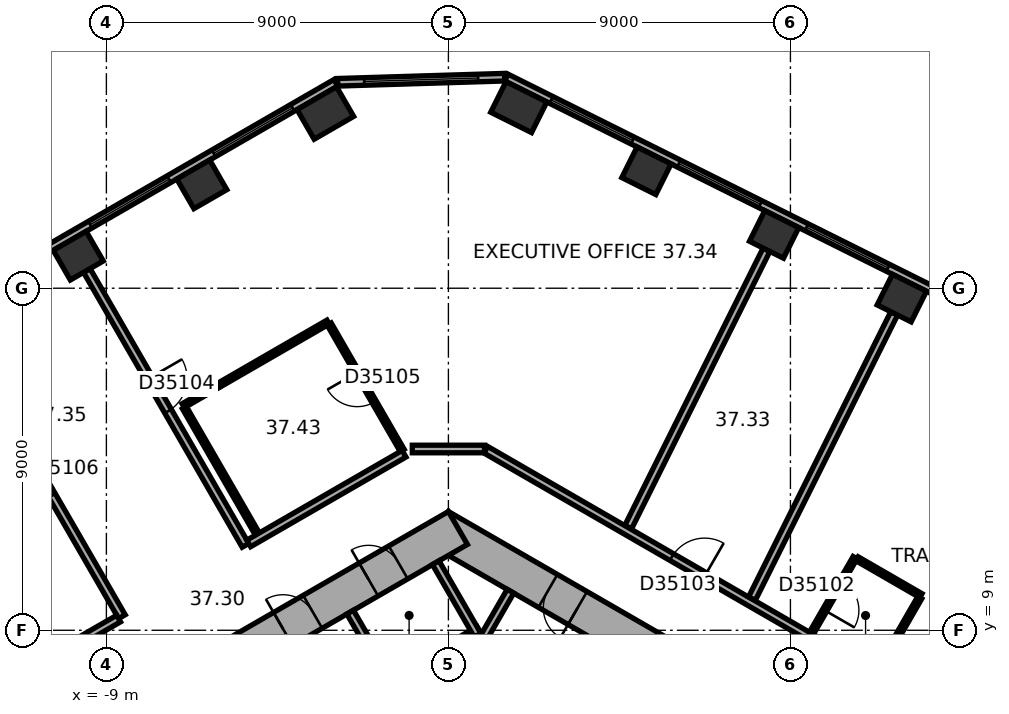
"""IFC4 building model, lengths in metres.
Left out: names, types, materials, properties, quantities, classifications, styles, units other than length and angle.
Written with IfcOpenShell. Run it as: python <this file> out.ifc"""

import sys

from ifc_helpers import new_model, si_unit, direction, frame, frame_2d, origin, origin_2d, place, context, subcontext, project, spatial, rectangle, extrude, element, fill, save


model = new_model("IFC4")
c1 = context("Model", 3, precision=1e-05, world=origin(), true_north=direction((0.0, 1.0)))
c2 = subcontext(c1, "Body", "Model", "MODEL_VIEW")
j1 = project(units=[si_unit("LENGTHUNIT", "METRE"), si_unit("PLANEANGLEUNIT", "RADIAN")], contexts=[c1])
p1 = place(None, origin())
s1 = spatial("IfcSite", under=j1, at=p1, CompositionType="ELEMENT")
p2 = place(p1, origin())
s2 = spatial("IfcBuilding", under=s1, at=p2, CompositionType="ELEMENT")
p3 = place(p2, frame((0.0, 0.0, 154.0)))
s3 = spatial("IfcBuildingStorey", under=s2, at=p3, CompositionType="ELEMENT", Elevation=154.0)
for number, where, z_axis, x_axis in (
    (1, (11.931, 17.74, 0.0), (0.0, 0.0, 1.0), (-0.895, 0.446, 0.0)),
    (2, (8.571, 19.416, 0.0), (0.0, 0.0, 1.0), (-0.895, 0.446, 0.0)),
    (3, (5.211, 21.091, 0.0), (0.0, 0.0, 1.0), (-0.895, 0.446, 0.0)),
):
    element("IfcColumn", number, at=place(p3, frame(where, z_axis=z_axis, x_axis=x_axis)), inside=s3, PredefinedType="COLUMN", context=c2, shape_type="SweptSolid", body=[
        extrude(rectangle(XDim=1.0, YDim=0.9, at=origin_2d()), origin(), (0.0, 0.0, 1.0), 3.7),
    ])
for number, where, z_axis, x_axis in (
    (4, (1.852, 22.766, 0.0), (0.0, 0.0, 1.0), (-0.895, 0.446, 0.0)),
    (5, (-3.238, 22.61, 0.0), (0.0, 0.0, 1.0), (-0.866, -0.5, 0.0)),
):
    element("IfcColumn", number, at=place(p3, frame(where, z_axis=z_axis, x_axis=x_axis)), inside=s3, PredefinedType="COLUMN", context=c2, shape_type="SweptSolid", body=[
        extrude(rectangle(XDim=1.2, YDim=0.9, at=origin_2d()), origin(), (0.0, 0.0, 1.0), 3.7),
    ])
for number, where, z_axis, x_axis in (
    (6, (-6.489, 20.733, 0.0), (0.0, 0.0, 1.0), (-0.866, -0.5, 0.0)),
    (7, (-9.74, 18.856, 0.0), (0.0, 0.0, 1.0), (-0.866, -0.5, 0.0)),
):
    element("IfcColumn", number, at=place(p3, frame(where, z_axis=z_axis, x_axis=x_axis)), inside=s3, PredefinedType="COLUMN", context=c2, shape_type="SweptSolid", body=[
        extrude(rectangle(XDim=1.0, YDim=0.9, at=origin_2d()), origin(), (0.0, 0.0, 1.0), 3.7),
    ])
p4 = place(p3, frame((10.25, 5.629, 0.0), z_axis=(0.0, 0.0, 1.0), x_axis=(-0.866022616891, 0.50000482701, 0.0)))
e8 = element("IfcWall", 8, at=p4, inside=s3, PredefinedType="SHEAR", context=c2, shape_type="SweptSolid", body=[
    extrude(rectangle(XDim=12.125, YDim=1.0, at=frame_2d((6.062, 0.0))), origin(), (0.0, 0.0, 1.0), 3.7),
])
p5 = place(p4, frame((4.012, 0.0, 0.0)))
e9 = element("IfcOpeningElement", 9, at=p5, cuts=e8, PredefinedType="OPENING", context=c2, shape_type="SweptSolid", body=[
    extrude(rectangle(XDim=0.9, YDim=2.1, at=frame_2d((0.45, 1.05))), frame((0.0, 0.51, 0.0), z_axis=(0.0, -1.0, 0.0), x_axis=(1.0, 0.0, 0.0)), (0.0, 0.0, 1.0), 1.02),
])
p6 = place(p4, frame((7.912, 0.0, 0.0)))
e10 = element("IfcOpeningElement", 10, at=p6, cuts=e8, PredefinedType="OPENING", context=c2, shape_type="SweptSolid", body=[
    extrude(rectangle(XDim=0.9, YDim=2.1, at=frame_2d((0.45, 1.05))), frame((0.0, 0.51, 0.0), z_axis=(0.0, -1.0, 0.0), x_axis=(1.0, 0.0, 0.0)), (0.0, 0.0, 1.0), 1.02),
])
p7 = place(p3, frame((0.25, 11.691, 0.0), z_axis=(0.0, 0.0, 1.0), x_axis=(-0.866022616891, -0.50000482701, 0.0)))
e11 = element("IfcWall", 11, at=p7, inside=s3, PredefinedType="SHEAR", context=c2, shape_type="SweptSolid", body=[
    extrude(rectangle(XDim=12.125, YDim=1.0, at=frame_2d((6.062, 0.0))), origin(), (0.0, 0.0, 1.0), 3.7),
])
p8 = place(p7, frame((6.262, 0.0, 0.0)))
e12 = element("IfcOpeningElement", 12, at=p8, cuts=e11, PredefinedType="OPENING", context=c2, shape_type="SweptSolid", body=[
    extrude(rectangle(XDim=1.5, YDim=2.1, at=frame_2d((0.75, 1.05))), frame((0.0, 0.51, 0.0), z_axis=(0.0, -1.0, 0.0), x_axis=(1.0, 0.0, 0.0)), (0.0, 0.0, 1.0), 1.02),
])
p9 = place(p7, frame((1.812, 0.0, 0.0)))
e13 = element("IfcOpeningElement", 13, at=p9, cuts=e11, PredefinedType="OPENING", context=c2, shape_type="SweptSolid", body=[
    extrude(rectangle(XDim=0.9, YDim=2.1, at=frame_2d((0.45, 1.05))), frame((0.0, 0.51, 0.0), z_axis=(0.0, -1.0, 0.0), x_axis=(1.0, 0.0, 0.0)), (0.0, 0.0, 1.0), 1.02),
])
p10 = place(p7, frame((4.412, 0.0, 0.0)))
e14 = element("IfcOpeningElement", 14, at=p10, cuts=e11, PredefinedType="OPENING", context=c2, shape_type="SweptSolid", body=[
    extrude(rectangle(XDim=0.9, YDim=2.1, at=frame_2d((0.45, 1.05))), frame((0.0, 0.51, 0.0), z_axis=(0.0, -1.0, 0.0), x_axis=(1.0, 0.0, 0.0)), (0.0, 0.0, 1.0), 1.02),
])
p11 = place(p3, frame((19.464, 14.599, 0.0), z_axis=(0.0, 0.0, 1.0), x_axis=(-0.894935755043, 0.446195018289, 0.0)))
e15 = element("IfcWall", 15, at=p11, inside=s3, PredefinedType="STANDARD", context=c2, shape_type="SweptSolid", body=[
    extrude(rectangle(XDim=20.044, YDim=0.2, at=frame_2d((10.022, 0.0))), origin(), (0.0, 0.0, 1.0), 3.7),
])
p12 = place(p11, frame((1.313, 0.0, 0.9)))
e16 = element("IfcOpeningElement", 16, at=p12, cuts=e15, PredefinedType="OPENING", context=c2, shape_type="SweptSolid", body=[
    extrude(rectangle(XDim=2.4, YDim=2.0, at=frame_2d((1.2, 1.0))), frame((0.0, 0.11, 0.0), z_axis=(0.0, -1.0, 0.0), x_axis=(1.0, 0.0, 0.0)), (0.0, 0.0, 1.0), 0.22),
])
p13 = place(p11, frame((5.067, 0.0, 0.9)))
e17 = element("IfcOpeningElement", 17, at=p13, cuts=e15, PredefinedType="OPENING", context=c2, shape_type="SweptSolid", body=[
    extrude(rectangle(XDim=2.4, YDim=2.0, at=frame_2d((1.2, 1.0))), frame((0.0, 0.11, 0.0), z_axis=(0.0, -1.0, 0.0), x_axis=(1.0, 0.0, 0.0)), (0.0, 0.0, 1.0), 0.22),
])
p14 = place(p11, frame((8.821, 0.0, 0.9)))
e18 = element("IfcOpeningElement", 18, at=p14, cuts=e15, PredefinedType="OPENING", context=c2, shape_type="SweptSolid", body=[
    extrude(rectangle(XDim=2.4, YDim=2.0, at=frame_2d((1.2, 1.0))), frame((0.0, 0.11, 0.0), z_axis=(0.0, -1.0, 0.0), x_axis=(1.0, 0.0, 0.0)), (0.0, 0.0, 1.0), 0.22),
])
p15 = place(p11, frame((12.575, 0.0, 0.9)))
e19 = element("IfcOpeningElement", 19, at=p15, cuts=e15, PredefinedType="OPENING", context=c2, shape_type="SweptSolid", body=[
    extrude(rectangle(XDim=2.4, YDim=2.0, at=frame_2d((1.2, 1.0))), frame((0.0, 0.11, 0.0), z_axis=(0.0, -1.0, 0.0), x_axis=(1.0, 0.0, 0.0)), (0.0, 0.0, 1.0), 0.22),
])
p16 = place(p11, frame((16.329, 0.0, 0.9)))
e20 = element("IfcOpeningElement", 20, at=p16, cuts=e15, PredefinedType="OPENING", context=c2, shape_type="SweptSolid", body=[
    extrude(rectangle(XDim=2.4, YDim=2.0, at=frame_2d((1.2, 1.0))), frame((0.0, 0.11, 0.0), z_axis=(0.0, -1.0, 0.0), x_axis=(1.0, 0.0, 0.0)), (0.0, 0.0, 1.0), 0.22),
])
p17 = place(p3, frame((1.479, 23.553, 0.0), z_axis=(0.0, 0.0, 1.0), x_axis=(-0.999534786117, -0.03049936625, 0.0)))
e21 = element("IfcWall", 21, at=p17, inside=s3, PredefinedType="STANDARD", context=c2, shape_type="SweptSolid", body=[
    extrude(rectangle(XDim=4.395, YDim=0.2, at=frame_2d((2.197, 0.0))), origin(), (0.0, 0.0, 1.0), 3.7),
])
p18 = place(p17, frame((0.698, 0.0, 0.9)))
e22 = element("IfcOpeningElement", 22, at=p18, cuts=e21, PredefinedType="OPENING", context=c2, shape_type="SweptSolid", body=[
    extrude(rectangle(XDim=3.0, YDim=2.0, at=frame_2d((1.5, 1.0))), frame((0.0, 0.11, 0.0), z_axis=(0.0, -1.0, 0.0), x_axis=(1.0, 0.0, 0.0)), (0.0, 0.0, 1.0), 0.22),
])
p19 = place(p3, frame((-2.961, 23.405, 0.0), z_axis=(0.0, 0.0, 1.0), x_axis=(-0.866023315909, -0.500003616288, 0.0)))
e23 = element("IfcWall", 23, at=p19, inside=s3, PredefinedType="STANDARD", context=c2, shape_type="SweptSolid", body=[
    extrude(rectangle(XDim=20.044, YDim=0.2, at=frame_2d((10.022, 0.0))), origin(), (0.0, 0.0, 1.0), 3.7),
])
p20 = place(p19, frame((1.314, 0.0, 0.9)))
e24 = element("IfcOpeningElement", 24, at=p20, cuts=e23, PredefinedType="OPENING", context=c2, shape_type="SweptSolid", body=[
    extrude(rectangle(XDim=2.4, YDim=2.0, at=frame_2d((1.2, 1.0))), frame((0.0, 0.11, 0.0), z_axis=(0.0, -1.0, 0.0), x_axis=(1.0, 0.0, 0.0)), (0.0, 0.0, 1.0), 0.22),
])
p21 = place(p19, frame((5.069, 0.0, 0.9)))
e25 = element("IfcOpeningElement", 25, at=p21, cuts=e23, PredefinedType="OPENING", context=c2, shape_type="SweptSolid", body=[
    extrude(rectangle(XDim=2.4, YDim=2.0, at=frame_2d((1.2, 1.0))), frame((0.0, 0.11, 0.0), z_axis=(0.0, -1.0, 0.0), x_axis=(1.0, 0.0, 0.0)), (0.0, 0.0, 1.0), 0.22),
])
p22 = place(p19, frame((8.823, 0.0, 0.9)))
e26 = element("IfcOpeningElement", 26, at=p22, cuts=e23, PredefinedType="OPENING", context=c2, shape_type="SweptSolid", body=[
    extrude(rectangle(XDim=2.4, YDim=2.0, at=frame_2d((1.2, 1.0))), frame((0.0, 0.11, 0.0), z_axis=(0.0, -1.0, 0.0), x_axis=(1.0, 0.0, 0.0)), (0.0, 0.0, 1.0), 0.22),
])
p23 = place(p19, frame((12.577, 0.0, 0.9)))
e27 = element("IfcOpeningElement", 27, at=p23, cuts=e23, PredefinedType="OPENING", context=c2, shape_type="SweptSolid", body=[
    extrude(rectangle(XDim=2.4, YDim=2.0, at=frame_2d((1.2, 1.0))), frame((0.0, 0.11, 0.0), z_axis=(0.0, -1.0, 0.0), x_axis=(1.0, 0.0, 0.0)), (0.0, 0.0, 1.0), 0.22),
])
p24 = place(p19, frame((16.331, 0.0, 0.9)))
e28 = element("IfcOpeningElement", 28, at=p24, cuts=e23, PredefinedType="OPENING", context=c2, shape_type="SweptSolid", body=[
    extrude(rectangle(XDim=2.4, YDim=2.0, at=frame_2d((1.2, 1.0))), frame((0.0, 0.11, 0.0), z_axis=(0.0, -1.0, 0.0), x_axis=(1.0, 0.0, 0.0)), (0.0, 0.0, 1.0), 0.22),
])
p25 = place(p3, frame((0.532, 8.122, 0.0), z_axis=(0.0, 0.0, 1.0), x_axis=(0.500077893725, 0.86598042715, 0.0)))
e29 = element("IfcWall", 29, at=p25, inside=s3, PredefinedType="PARTITIONING", context=c2, shape_type="SweptSolid", body=[
    extrude(rectangle(XDim=2.2, YDim=0.2, at=frame_2d((1.1, 0.0))), origin(), (0.0, 0.0, 1.0), 3.42),
])
p26 = place(p3, frame((0.803, 9.009, 0.0), z_axis=(0.0, 0.0, 1.0), x_axis=(-0.866028230842, -0.499995103361, 0.0)))
e30 = element("IfcWall", 30, at=p26, inside=s3, PredefinedType="PARTITIONING", context=c2, shape_type="SweptSolid", body=[
    extrude(rectangle(XDim=5.4, YDim=0.2, at=frame_2d((2.7, 0.0))), origin(), (0.0, 0.0, 1.0), 3.42),
])
p27 = place(p3, frame((0.767, 8.872, 0.0), z_axis=(0.0, 0.0, 1.0), x_axis=(-0.499994660107, 0.866028486751, 0.0)))
e31 = element("IfcWall", 31, at=p27, inside=s3, PredefinedType="PARTITIONING", context=c2, shape_type="SweptSolid", body=[
    extrude(rectangle(XDim=2.2, YDim=0.2, at=frame_2d((1.1, 0.0))), origin(), (0.0, 0.0, 1.0), 3.42),
])
p28 = place(p3, frame((-1.485, 7.572, 0.0), z_axis=(0.0, 0.0, 1.0), x_axis=(-0.50002983664, 0.866008176907, 0.0)))
e32 = element("IfcWall", 32, at=p28, inside=s3, PredefinedType="PARTITIONING", context=c2, shape_type="SweptSolid", body=[
    extrude(rectangle(XDim=2.2, YDim=0.2, at=frame_2d((1.1, 0.0))), origin(), (0.0, 0.0, 1.0), 3.42),
])
p29 = place(p3, frame((-12.766, 16.589, 0.0), z_axis=(0.0, 0.0, 1.0), x_axis=(0.500010139422, -0.866019549707, 0.0)))
e33 = element("IfcWall", 33, at=p29, inside=s3, PredefinedType="PARTITIONING", context=c2, shape_type="SweptSolid", body=[
    extrude(rectangle(XDim=8.35, YDim=0.2, at=frame_2d((4.175, 0.0))), origin(), (0.0, 0.0, 1.0), 3.42),
])
p30 = place(p29, frame((3.675, 0.0, 0.0)))
e34 = element("IfcOpeningElement", 34, at=p30, cuts=e33, PredefinedType="OPENING", context=c2, shape_type="SweptSolid", body=[
    extrude(rectangle(XDim=1.0, YDim=2.1, at=frame_2d((0.5, 1.05))), frame((0.0, 0.11, 0.0), z_axis=(0.0, -1.0, 0.0), x_axis=(1.0, 0.0, 0.0)), (0.0, 0.0, 1.0), 0.22),
])
p31 = place(p3, frame((-9.515, 18.466, 0.0), z_axis=(0.0, 0.0, 1.0), x_axis=(0.500010139422, -0.866019549707, 0.0)))
e35 = element("IfcWall", 35, at=p31, inside=s3, PredefinedType="PARTITIONING", context=c2, shape_type="SweptSolid", body=[
    extrude(rectangle(XDim=8.35, YDim=0.2, at=frame_2d((4.175, 0.0))), origin(), (0.0, 0.0, 1.0), 2.87),
])
p32 = place(p31, frame((3.275, 0.0, 0.0)))
e36 = element("IfcOpeningElement", 36, at=p32, cuts=e35, PredefinedType="OPENING", context=c2, shape_type="SweptSolid", body=[
    extrude(rectangle(XDim=1.0, YDim=2.1, at=frame_2d((0.5, 1.05))), frame((0.0, 0.11, 0.0), z_axis=(0.0, -1.0, 0.0), x_axis=(1.0, 0.0, 0.0)), (0.0, 0.0, 1.0), 0.22),
])
p33 = place(p3, frame((-8.678, 9.308, 0.0), z_axis=(0.0, 0.0, 1.0), x_axis=(-0.866000359435, -0.500043375578, 0.0)))
e37 = element("IfcWall", 37, at=p33, inside=s3, PredefinedType="PARTITIONING", context=c2, shape_type="SweptSolid", body=[
    extrude(rectangle(XDim=3.161, YDim=0.2, at=frame_2d((1.581, 0.0))), origin(), (0.0, 0.0, 1.0), 3.42),
])
p34 = place(p3, frame((-6.977, 14.909, 0.0), z_axis=(0.0, 0.0, 1.0), x_axis=(0.866032203192, 0.499988222896, 0.0)))
e38 = element("IfcWall", 38, at=p34, inside=s3, PredefinedType="PARTITIONING", context=c2, shape_type="SweptSolid", body=[
    extrude(rectangle(XDim=4.4, YDim=0.12, at=frame_2d((2.2, 0.0))), origin(), (0.0, 0.0, 1.0), 3.42),
])
p35 = place(p3, frame((-5.027, 11.531, 0.0), z_axis=(0.0, 0.0, 1.0), x_axis=(-0.499995802899, 0.866027826969, 0.0)))
e39 = element("IfcWall", 39, at=p35, inside=s3, PredefinedType="PARTITIONING", context=c2, shape_type="SweptSolid", body=[
    extrude(rectangle(XDim=3.84, YDim=0.12, at=frame_2d((1.92, 0.0))), origin(), (0.0, 0.0, 1.0), 3.42),
])
p36 = place(p3, frame((-3.136, 17.057, 0.0), z_axis=(0.0, 0.0, 1.0), x_axis=(0.499995802899, -0.866027826969, 0.0)))
e40 = element("IfcWall", 40, at=p36, inside=s3, PredefinedType="PARTITIONING", context=c2, shape_type="SweptSolid", body=[
    extrude(rectangle(XDim=3.84, YDim=0.12, at=frame_2d((1.92, 0.0))), origin(), (0.0, 0.0, 1.0), 3.42),
])
p37 = place(p36, frame((1.47, 0.0, 0.0)))
e41 = element("IfcOpeningElement", 41, at=p37, cuts=e40, PredefinedType="OPENING", context=c2, shape_type="SweptSolid", body=[
    extrude(rectangle(XDim=0.9, YDim=2.1, at=frame_2d((0.45, 1.05))), frame((0.0, 0.07, 0.0), z_axis=(0.0, -1.0, 0.0), x_axis=(1.0, 0.0, 0.0)), (0.0, 0.0, 1.0), 0.14),
])
p38 = place(p3, frame((-1.167, 13.645, 0.0), z_axis=(0.0, 0.0, 1.0), x_axis=(-0.866034830959, -0.499983671299, 0.0)))
e42 = element("IfcWall", 42, at=p38, inside=s3, PredefinedType="PARTITIONING", context=c2, shape_type="SweptSolid", body=[
    extrude(rectangle(XDim=4.719, YDim=0.2, at=frame_2d((2.36, 0.0))), origin(), (0.0, 0.0, 1.0), 3.42),
])
p39 = place(p3, frame((0.95, 13.77, 0.0), z_axis=(0.0, 0.0, 1.0), x_axis=(-1.0, 0.0, 0.0)))
e43 = element("IfcWall", 43, at=p39, inside=s3, PredefinedType="PARTITIONING", context=c2, shape_type="SweptSolid", body=[
    extrude(rectangle(XDim=1.9, YDim=0.2, at=frame_2d((0.95, 0.0))), origin(), (0.0, 0.0, 1.0), 3.42),
])
p40 = place(p3, frame((8.37, 19.013, 0.0), z_axis=(0.0, 0.0, 1.0), x_axis=(-0.446183598632, -0.894941448538, 0.0)))
e44 = element("IfcWall", 44, at=p40, inside=s3, PredefinedType="PARTITIONING", context=c2, shape_type="SweptSolid", body=[
    extrude(rectangle(XDim=8.156, YDim=0.2, at=frame_2d((4.078, 0.0))), origin(), (0.0, 0.0, 1.0), 3.42),
])
p41 = place(p3, frame((9.552, 8.919, 0.0), z_axis=(0.0, 0.0, 1.0), x_axis=(0.499952165731, 0.866053019151, 0.0)))
e45 = element("IfcWall", 45, at=p41, inside=s3, PredefinedType="PARTITIONING", context=c2, shape_type="SweptSolid", body=[
    extrude(rectangle(XDim=2.3, YDim=0.12, at=frame_2d((1.15, 0.0))), origin(), (0.0, 0.0, 1.0), 3.42),
])
p42 = place(p41, frame((0.7, 0.0, 0.0)))
e46 = element("IfcOpeningElement", 46, at=p42, cuts=e45, PredefinedType="OPENING", context=c2, shape_type="SweptSolid", body=[
    extrude(rectangle(XDim=0.9, YDim=2.1, at=frame_2d((0.45, 1.05))), frame((0.0, 0.07, 0.0), z_axis=(0.0, -1.0, 0.0), x_axis=(1.0, 0.0, 0.0)), (0.0, 0.0, 1.0), 0.14),
])
p43 = place(p3, frame((10.753, 10.881, 0.0), z_axis=(0.0, 0.0, 1.0), x_axis=(0.866043088465, -0.499969367985, 0.0)))
e47 = element("IfcWall", 47, at=p43, inside=s3, PredefinedType="PARTITIONING", context=c2, shape_type="SweptSolid", body=[
    extrude(rectangle(XDim=1.94, YDim=0.12, at=frame_2d((0.97, 0.0))), origin(), (0.0, 0.0, 1.0), 3.42),
])
p44 = place(p3, frame((11.233, 7.833, 0.0), z_axis=(0.0, 0.0, 1.0), x_axis=(-0.866021713988, 0.50000639086, 0.0)))
e48 = element("IfcWall", 48, at=p44, inside=s3, PredefinedType="PARTITIONING", context=c2, shape_type="SweptSolid", body=[
    extrude(rectangle(XDim=11.834, YDim=0.2, at=frame_2d((5.917, 0.0))), origin(), (0.0, 0.0, 1.0), 3.42),
])
p45 = place(p44, frame((5.185, 0.0, 0.0)))
e49 = element("IfcOpeningElement", 49, at=p45, cuts=e48, PredefinedType="OPENING", context=c2, shape_type="SweptSolid", body=[
    extrude(rectangle(XDim=1.0, YDim=2.1, at=frame_2d((0.5, 1.05))), frame((0.0, 0.11, 0.0), z_axis=(0.0, -1.0, 0.0), x_axis=(1.0, 0.0, 0.0)), (0.0, 0.0, 1.0), 0.22),
])
p46 = place(p3, frame((11.73, 17.338, 0.0), z_axis=(0.0, 0.0, 1.0), x_axis=(-0.446165200553, -0.894950620881, 0.0)))
e50 = element("IfcWall", 50, at=p46, inside=s3, PredefinedType="PARTITIONING", context=c2, shape_type="SweptSolid", body=[
    extrude(rectangle(XDim=8.386, YDim=0.2, at=frame_2d((4.193, 0.0))), origin(), (0.0, 0.0, 1.0), 2.87),
])
p47 = place(p3, frame((12.404, 9.859, 0.0), z_axis=(0.0, 0.0, 1.0), x_axis=(-0.500030632641, -0.866007717299, 0.0)))
e51 = element("IfcWall", 51, at=p47, inside=s3, PredefinedType="PARTITIONING", context=c2, shape_type="SweptSolid", body=[
    extrude(rectangle(XDim=2.24, YDim=0.12, at=frame_2d((1.12, 0.0))), origin(), (0.0, 0.0, 1.0), 3.42),
])
p48 = place(p14, origin())
e52 = element("IfcWindow", 52, at=p48, inside=s3, PartitioningType="SINGLE_PANEL", PredefinedType="WINDOW", context=c2, shape_type="SweptSolid", body=[
    extrude(rectangle(XDim=2.4, YDim=2.0, at=frame_2d((1.2, 1.0))), frame((0.0, 0.03, 0.0), z_axis=(0.0, -1.0, 0.0), x_axis=(1.0, 0.0, 0.0)), (0.0, 0.0, 1.0), 0.06),
])
fill(e18, e52)
p49 = place(p15, origin())
e53 = element("IfcWindow", 53, at=p49, inside=s3, PartitioningType="SINGLE_PANEL", PredefinedType="WINDOW", context=c2, shape_type="SweptSolid", body=[
    extrude(rectangle(XDim=2.4, YDim=2.0, at=frame_2d((1.2, 1.0))), frame((0.0, 0.03, 0.0), z_axis=(0.0, -1.0, 0.0), x_axis=(1.0, 0.0, 0.0)), (0.0, 0.0, 1.0), 0.06),
])
fill(e19, e53)
p50 = place(p16, origin())
e54 = element("IfcWindow", 54, at=p50, inside=s3, PartitioningType="SINGLE_PANEL", PredefinedType="WINDOW", context=c2, shape_type="SweptSolid", body=[
    extrude(rectangle(XDim=2.4, YDim=2.0, at=frame_2d((1.2, 1.0))), frame((0.0, 0.03, 0.0), z_axis=(0.0, -1.0, 0.0), x_axis=(1.0, 0.0, 0.0)), (0.0, 0.0, 1.0), 0.06),
])
fill(e20, e54)
p51 = place(p18, origin())
e55 = element("IfcWindow", 55, at=p51, inside=s3, PartitioningType="SINGLE_PANEL", PredefinedType="WINDOW", context=c2, shape_type="SweptSolid", body=[
    extrude(rectangle(XDim=3.0, YDim=2.0, at=frame_2d((1.5, 1.0))), frame((0.0, 0.03, 0.0), z_axis=(0.0, -1.0, 0.0), x_axis=(1.0, 0.0, 0.0)), (0.0, 0.0, 1.0), 0.06),
])
fill(e22, e55)
p52 = place(p20, origin())
e56 = element("IfcWindow", 56, at=p52, inside=s3, PartitioningType="SINGLE_PANEL", PredefinedType="WINDOW", context=c2, shape_type="SweptSolid", body=[
    extrude(rectangle(XDim=2.4, YDim=2.0, at=frame_2d((1.2, 1.0))), frame((0.0, 0.03, 0.0), z_axis=(0.0, -1.0, 0.0), x_axis=(1.0, 0.0, 0.0)), (0.0, 0.0, 1.0), 0.06),
])
fill(e24, e56)
p53 = place(p21, origin())
e57 = element("IfcWindow", 57, at=p53, inside=s3, PartitioningType="SINGLE_PANEL", PredefinedType="WINDOW", context=c2, shape_type="SweptSolid", body=[
    extrude(rectangle(XDim=2.4, YDim=2.0, at=frame_2d((1.2, 1.0))), frame((0.0, 0.03, 0.0), z_axis=(0.0, -1.0, 0.0), x_axis=(1.0, 0.0, 0.0)), (0.0, 0.0, 1.0), 0.06),
])
fill(e25, e57)
p54 = place(p6, origin())
e58 = element("IfcDoor", 58, at=p54, inside=s3, OperationType="SINGLE_SWING_LEFT", PredefinedType="DOOR", context=c2, shape_type="SweptSolid", body=[
    extrude(rectangle(XDim=0.9, YDim=2.1, at=frame_2d((0.45, 1.05))), frame((0.0, 0.025, 0.0), z_axis=(0.0, -1.0, 0.0), x_axis=(1.0, 0.0, 0.0)), (0.0, 0.0, 1.0), 0.05),
])
fill(e10, e58)
p55 = place(p9, origin())
e59 = element("IfcDoor", 59, at=p55, inside=s3, OperationType="SINGLE_SWING_LEFT", PredefinedType="DOOR", context=c2, shape_type="SweptSolid", body=[
    extrude(rectangle(XDim=0.9, YDim=2.1, at=frame_2d((0.45, 1.05))), frame((0.0, 0.025, 0.0), z_axis=(0.0, -1.0, 0.0), x_axis=(1.0, 0.0, 0.0)), (0.0, 0.0, 1.0), 0.05),
])
fill(e13, e59)
p56 = place(p10, origin())
e60 = element("IfcDoor", 60, at=p56, inside=s3, OperationType="SINGLE_SWING_LEFT", PredefinedType="DOOR", context=c2, shape_type="SweptSolid", body=[
    extrude(rectangle(XDim=0.9, YDim=2.1, at=frame_2d((0.45, 1.05))), frame((0.0, 0.025, 0.0), z_axis=(0.0, -1.0, 0.0), x_axis=(1.0, 0.0, 0.0)), (0.0, 0.0, 1.0), 0.05),
])
fill(e14, e60)
p57 = place(p42, origin())
e61 = element("IfcDoor", 61, at=p57, inside=s3, OperationType="SINGLE_SWING_LEFT", PredefinedType="DOOR", context=c2, shape_type="SweptSolid", body=[
    extrude(rectangle(XDim=0.9, YDim=2.1, at=frame_2d((0.45, 1.05))), frame((0.0, 0.025, 0.0), z_axis=(0.0, -1.0, 0.0), x_axis=(1.0, 0.0, 0.0)), (0.0, 0.0, 1.0), 0.05),
])
fill(e46, e61)
p58 = place(p45, origin())
e62 = element("IfcDoor", 62, at=p58, inside=s3, OperationType="SINGLE_SWING_LEFT", PredefinedType="DOOR", context=c2, shape_type="SweptSolid", body=[
    extrude(rectangle(XDim=1.0, YDim=2.1, at=frame_2d((0.5, 1.05))), frame((0.0, 0.025, 0.0), z_axis=(0.0, -1.0, 0.0), x_axis=(1.0, 0.0, 0.0)), (0.0, 0.0, 1.0), 0.05),
])
fill(e49, e62)
p59 = place(p32, origin())
e63 = element("IfcDoor", 63, at=p59, inside=s3, OperationType="SINGLE_SWING_LEFT", PredefinedType="DOOR", context=c2, shape_type="SweptSolid", body=[
    extrude(rectangle(XDim=1.0, YDim=2.1, at=frame_2d((0.5, 1.05))), frame((0.0, 0.025, 0.0), z_axis=(0.0, -1.0, 0.0), x_axis=(1.0, 0.0, 0.0)), (0.0, 0.0, 1.0), 0.05),
])
fill(e36, e63)
p60 = place(p37, origin())
e64 = element("IfcDoor", 64, at=p60, inside=s3, OperationType="SINGLE_SWING_LEFT", PredefinedType="DOOR", context=c2, shape_type="SweptSolid", body=[
    extrude(rectangle(XDim=0.9, YDim=2.1, at=frame_2d((0.45, 1.05))), frame((0.0, 0.025, 0.0), z_axis=(0.0, -1.0, 0.0), x_axis=(1.0, 0.0, 0.0)), (0.0, 0.0, 1.0), 0.05),
])
fill(e41, e64)
p61 = place(p30, origin())
e65 = element("IfcDoor", 65, at=p61, inside=s3, OperationType="SINGLE_SWING_LEFT", PredefinedType="DOOR", context=c2, shape_type="SweptSolid", body=[
    extrude(rectangle(XDim=1.0, YDim=2.1, at=frame_2d((0.5, 1.05))), frame((0.0, 0.025, 0.0), z_axis=(0.0, -1.0, 0.0), x_axis=(1.0, 0.0, 0.0)), (0.0, 0.0, 1.0), 0.05),
])
fill(e34, e65)
save(model, sys.argv[1])
